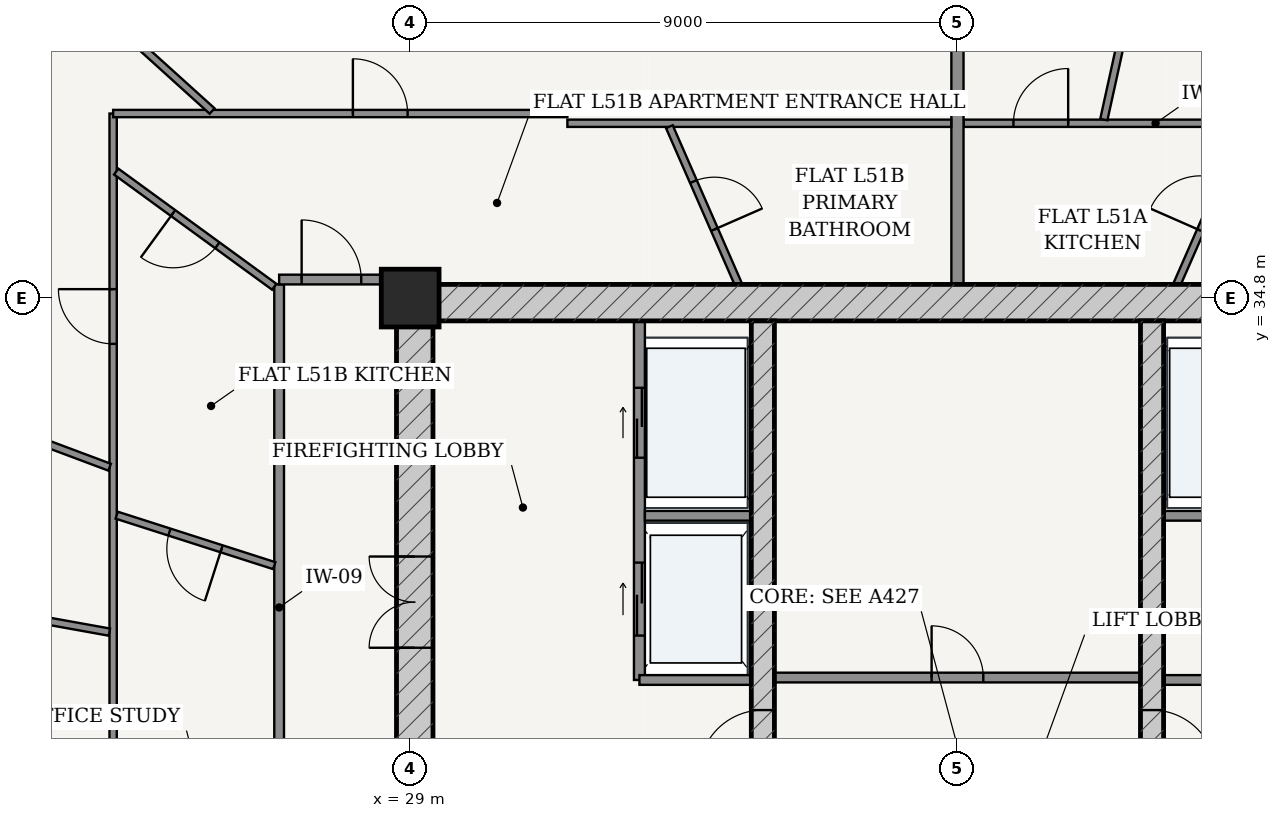
"""IFC4 building model, lengths in metres.
Left out: names, types, materials, properties, quantities, classifications, styles, units other than length and angle.
Written with IfcOpenShell. Run it as: python <this file> out.ifc"""

import sys

from ifc_helpers import new_model, si_unit, direction, frame, frame_2d, origin, origin_2d, place, context, subcontext, project, spatial, rectangle, extrude, source, transform, mapped, element, fill, save


model = new_model("IFC4")
c1 = context("Model", 3, precision=1e-05, world=origin(), true_north=direction((-0.2419218956, 0.970295726276)))
c2 = subcontext(c1, "Body", "Model", "MODEL_VIEW")
j1 = project(units=[si_unit("LENGTHUNIT", "METRE"), si_unit("PLANEANGLEUNIT", "RADIAN")], contexts=[c1])
p1 = place(None, origin())
s1 = spatial("IfcSite", under=j1, at=p1, CompositionType="ELEMENT")
p2 = place(p1, origin())
s2 = spatial("IfcBuilding", under=s1, at=p2, CompositionType="ELEMENT")
p3 = place(p2, frame((0.0, 0.0, 194.9)))
s3 = spatial("IfcBuildingStorey", under=s2, at=p3, CompositionType="ELEMENT", Elevation=194.9)
p4 = place(p3, frame((29.0, 34.8, 0.0), z_axis=(0.0, 0.0, 1.0), x_axis=(1.0, 0.0, 0.0)))
e1 = element("IfcColumn", 1, at=p4, inside=s3, PredefinedType="COLUMN", context=c2, shape_type="SweptSolid", body=[
    extrude(rectangle(XDim=0.95, YDim=0.95, at=origin_2d()), origin(), (0.0, 0.0, 1.0), 3.7),
])
p5 = place(p3, frame((28.775, 34.725, 0.0), z_axis=(0.0, 0.0, 1.0), x_axis=(1.0, 0.0, 0.0)))
e2 = element("IfcWall", 2, at=p5, inside=s3, PredefinedType="SHEAR", context=c2, shape_type="SweptSolid", body=[
    extrude(rectangle(XDim=18.45, YDim=0.6, at=frame_2d((9.225, 0.0))), origin(), (0.0, 0.0, 1.0), 3.435),
])
p6 = place(p3, frame((29.075, 19.175, 0.0), z_axis=(0.0, 0.0, 1.0), x_axis=(0.0, 1.0, 0.0)))
e3 = element("IfcWall", 3, at=p6, inside=s3, PredefinedType="SHEAR", context=c2, shape_type="SweptSolid", body=[
    extrude(rectangle(XDim=15.25, YDim=0.6, at=frame_2d((7.625, 0.0))), origin(), (0.0, 0.0, 1.0), 3.435),
])
p7 = place(p6, frame((9.875, 0.0, 0.0)))
e4 = element("IfcOpeningElement", 4, at=p7, cuts=e3, PredefinedType="OPENING", context=c2, shape_type="SweptSolid", body=[
    extrude(rectangle(XDim=1.5, YDim=2.2, at=frame_2d((0.75, 1.1))), frame((0.0, 0.31, 0.0), z_axis=(0.0, -1.0, 0.0), x_axis=(1.0, 0.0, 0.0)), (0.0, 0.0, 1.0), 0.62),
])
p8 = place(p3, frame((34.8, 19.175, 0.0), z_axis=(0.0, 0.0, 1.0), x_axis=(0.0, 1.0, 0.0)))
e5 = element("IfcWall", 5, at=p8, inside=s3, PredefinedType="SHEAR", context=c2, shape_type="SweptSolid", body=[
    extrude(rectangle(XDim=15.25, YDim=0.38, at=frame_2d((7.625, 0.0))), origin(), (0.0, 0.0, 1.0), 3.435),
])
p9 = place(p8, frame((7.8, 0.0, 0.0)))
e6 = element("IfcOpeningElement", 6, at=p9, cuts=e5, PredefinedType="OPENING", context=c2, shape_type="SweptSolid", body=[
    extrude(rectangle(XDim=1.05, YDim=2.15, at=frame_2d((0.525, 1.075))), frame((0.0, 0.2, 0.0), z_axis=(0.0, -1.0, 0.0), x_axis=(1.0, 0.0, 0.0)), (0.0, 0.0, 1.0), 0.4),
])
p10 = place(p3, frame((41.2, 19.175, 0.0), z_axis=(0.0, 0.0, 1.0), x_axis=(0.0, 1.0, 0.0)))
e7 = element("IfcWall", 7, at=p10, inside=s3, PredefinedType="SHEAR", context=c2, shape_type="SweptSolid", body=[
    extrude(rectangle(XDim=15.25, YDim=0.38, at=frame_2d((7.625, 0.0))), origin(), (0.0, 0.0, 1.0), 3.435),
])
p11 = place(p10, frame((7.8, 0.0, 0.0)))
e8 = element("IfcOpeningElement", 8, at=p11, cuts=e7, PredefinedType="OPENING", context=c2, shape_type="SweptSolid", body=[
    extrude(rectangle(XDim=1.05, YDim=2.15, at=frame_2d((0.525, 1.075))), frame((0.0, 0.2, 0.0), z_axis=(0.0, -1.0, 0.0), x_axis=(1.0, 0.0, 0.0)), (0.0, 0.0, 1.0), 0.4),
])
p12 = place(p3, frame((32.77, 28.52, 0.0), z_axis=(0.0, 0.0, 1.0), x_axis=(0.0, 1.0, 0.0)))
e9 = element("IfcWall", 9, at=p12, inside=s3, PredefinedType="PARTITIONING", context=c2, shape_type="SweptSolid", body=[
    extrude(rectangle(XDim=5.905, YDim=0.18, at=frame_2d((2.953, 0.0))), origin(), (0.0, 0.0, 1.0), 3.435),
])
p13 = place(p12, frame((3.655, 0.0, 0.0)))
e10 = element("IfcOpeningElement", 10, at=p13, cuts=e9, PredefinedType="OPENING", context=c2, shape_type="SweptSolid", body=[
    extrude(rectangle(XDim=1.15, YDim=2.2, at=frame_2d((0.575, 1.1))), frame((0.0, 0.1, 0.0), z_axis=(0.0, -1.0, 0.0), x_axis=(1.0, 0.0, 0.0)), (0.0, 0.0, 1.0), 0.2),
])
p14 = place(p12, frame((0.73, 0.0, 0.0)))
e11 = element("IfcOpeningElement", 11, at=p14, cuts=e9, PredefinedType="OPENING", context=c2, shape_type="SweptSolid", body=[
    extrude(rectangle(XDim=1.2, YDim=2.25, at=frame_2d((0.6, 1.125))), frame((0.0, 0.1, 0.0), z_axis=(0.0, -1.0, 0.0), x_axis=(1.0, 0.0, 0.0)), (0.0, 0.0, 1.0), 0.2),
])
p15 = place(p3, frame((32.86, 31.22, 0.0), z_axis=(0.0, 0.0, 1.0), x_axis=(1.0, 0.0, 0.0)))
e12 = element("IfcWall", 12, at=p15, inside=s3, PredefinedType="PARTITIONING", context=c2, shape_type="SweptSolid", body=[
    extrude(rectangle(XDim=1.75, YDim=0.16, at=frame_2d((0.875, 0.0))), origin(), (0.0, 0.0, 1.0), 3.435),
])
p16 = place(p3, frame((32.77, 28.52, 0.0), z_axis=(0.0, 0.0, 1.0), x_axis=(1.0, 0.0, 0.0)))
e13 = element("IfcWall", 13, at=p16, inside=s3, PredefinedType="PARTITIONING", context=c2, shape_type="SweptSolid", body=[
    extrude(rectangle(XDim=1.84, YDim=0.16, at=frame_2d((0.92, 0.0))), origin(), (0.0, 0.0, 1.0), 3.435),
])
p17 = place(p3, frame((41.39, 31.22, 0.0), z_axis=(0.0, 0.0, 1.0), x_axis=(1.0, 0.0, 0.0)))
e14 = element("IfcWall", 14, at=p17, inside=s3, PredefinedType="PARTITIONING", context=c2, shape_type="SweptSolid", body=[
    extrude(rectangle(XDim=1.75, YDim=0.16, at=frame_2d((0.875, 0.0))), origin(), (0.0, 0.0, 1.0), 3.435),
])
p18 = place(p3, frame((41.39, 28.52, 0.0), z_axis=(0.0, 0.0, 1.0), x_axis=(1.0, 0.0, 0.0)))
e15 = element("IfcWall", 15, at=p18, inside=s3, PredefinedType="PARTITIONING", context=c2, shape_type="SweptSolid", body=[
    extrude(rectangle(XDim=1.84, YDim=0.16, at=frame_2d((0.92, 0.0))), origin(), (0.0, 0.0, 1.0), 3.435),
])
p19 = place(p3, frame((34.99, 28.56, 0.0), z_axis=(0.0, 0.0, 1.0), x_axis=(1.0, 0.0, 0.0)))
e16 = element("IfcWall", 16, at=p19, inside=s3, PredefinedType="PARTITIONING", context=c2, shape_type="SweptSolid", body=[
    extrude(rectangle(XDim=6.02, YDim=0.16, at=frame_2d((3.01, 0.0))), origin(), (0.0, 0.0, 1.0), 3.435),
])
p20 = place(p19, frame((2.585, 0.0, 0.0)))
e17 = element("IfcOpeningElement", 17, at=p20, cuts=e16, PredefinedType="OPENING", context=c2, shape_type="SweptSolid", body=[
    extrude(rectangle(XDim=0.85, YDim=2.1, at=frame_2d((0.425, 1.05))), frame((0.0, 0.09, 0.0), z_axis=(0.0, -1.0, 0.0), x_axis=(1.0, 0.0, 0.0)), (0.0, 0.0, 1.0), 0.18),
])
p21 = place(p3, frame((26.845, 24.4, 0.0), z_axis=(0.0, 0.0, 1.0), x_axis=(0.0, 1.0, 0.0)))
e18 = element("IfcWall", 18, at=p21, inside=s3, PredefinedType="PARTITIONING", context=c2, shape_type="SweptSolid", body=[
    extrude(rectangle(XDim=10.625, YDim=0.16, at=frame_2d((5.312, 0.0))), origin(), (0.0, 0.0, 1.0), 2.951),
])
p22 = place(p3, frame((26.845, 35.105, 0.0), z_axis=(0.0, 0.0, 1.0), x_axis=(1.0, 0.0, 0.0)))
e19 = element("IfcWall", 19, at=p22, inside=s3, PredefinedType="PARTITIONING", context=c2, shape_type="SweptSolid", body=[
    extrude(rectangle(XDim=1.93, YDim=0.16, at=frame_2d((0.965, 0.0))), origin(), (0.0, 0.0, 1.0), 3.435),
])
p23 = place(p22, frame((0.37, 0.0, 0.0)))
e20 = element("IfcOpeningElement", 20, at=p23, cuts=e19, PredefinedType="OPENING", context=c2, shape_type="SweptSolid", body=[
    extrude(rectangle(XDim=0.98, YDim=2.2, at=frame_2d((0.49, 1.1))), frame((0.0, 0.09, 0.0), z_axis=(0.0, -1.0, 0.0), x_axis=(1.0, 0.0, 0.0)), (0.0, 0.0, 1.0), 0.18),
])
p24 = place(p3, frame((38.102, 37.675, 0.0), z_axis=(0.0, 0.0, 1.0), x_axis=(1.0, 0.0, 0.0)))
e21 = element("IfcWall", 21, at=p24, inside=s3, PredefinedType="PARTITIONING", context=c2, shape_type="SweptSolid", body=[
    extrude(rectangle(XDim=6.313, YDim=0.12, at=frame_2d((3.156, 0.0))), origin(), (0.0, 0.0, 1.0), 2.951),
])
p25 = place(p24, frame((0.819, 0.0, 0.0)))
e22 = element("IfcOpeningElement", 22, at=p25, cuts=e21, PredefinedType="OPENING", context=c2, shape_type="SweptSolid", body=[
    extrude(rectangle(XDim=0.9, YDim=2.15, at=frame_2d((0.45, 1.075))), frame((0.0, 0.07, 0.0), z_axis=(0.0, -1.0, 0.0), x_axis=(1.0, 0.0, 0.0)), (0.0, 0.0, 1.0), 0.14),
])
p26 = place(p3, frame((40.407, 37.736, 0.0), z_axis=(0.0, 0.0, 1.0), x_axis=(0.214971015179, 0.97662042915, 0.0)))
e23 = element("IfcWall", 23, at=p26, inside=s3, PredefinedType="PARTITIONING", context=c2, shape_type="SweptSolid", body=[
    extrude(rectangle(XDim=8.485, YDim=0.12, at=frame_2d((4.242, 0.0))), origin(), (0.0, 0.0, 1.0), 2.951),
])
p27 = place(p26, frame((2.78, 0.0, 0.0)))
e24 = element("IfcOpeningElement", 24, at=p27, cuts=e23, PredefinedType="OPENING", context=c2, shape_type="SweptSolid", body=[
    extrude(rectangle(XDim=0.9, YDim=2.15, at=frame_2d((0.45, 1.075))), frame((0.0, 0.07, 0.0), z_axis=(0.0, -1.0, 0.0), x_axis=(1.0, 0.0, 0.0)), (0.0, 0.0, 1.0), 0.14),
])
p28 = place(p3, frame((41.61, 35.027, 0.0), z_axis=(0.0, 0.0, 1.0), x_axis=(0.401859508224, 0.915701335398, 0.0)))
e25 = element("IfcWall", 25, at=p28, inside=s3, PredefinedType="PARTITIONING", context=c2, shape_type="SweptSolid", body=[
    extrude(rectangle(XDim=2.83, YDim=0.12, at=frame_2d((1.415, 0.0))), origin(), (0.0, 0.0, 1.0), 3.435),
])
p29 = place(p28, frame((0.965, 0.0, 0.0)))
e26 = element("IfcOpeningElement", 26, at=p29, cuts=e25, PredefinedType="OPENING", context=c2, shape_type="SweptSolid", body=[
    extrude(rectangle(XDim=0.9, YDim=2.15, at=frame_2d((0.45, 1.075))), frame((0.0, 0.07, 0.0), z_axis=(0.0, -1.0, 0.0), x_axis=(1.0, 0.0, 0.0)), (0.0, 0.0, 1.0), 0.14),
])
p30 = place(p3, frame((38.0, 35.027, 0.0), z_axis=(0.0, 0.0, 1.0), x_axis=(0.0, 1.0, 0.0)))
e27 = element("IfcWall", 27, at=p30, inside=s3, PredefinedType="PARTITIONING", context=c2, shape_type="SweptSolid", body=[
    extrude(rectangle(XDim=11.413, YDim=0.2, at=frame_2d((5.707, 0.0))), origin(), (0.0, 0.0, 1.0), 2.52),
])
p31 = place(p3, frame((24.115, 24.406, 0.0), z_axis=(0.0, 0.0, 1.0), x_axis=(0.0, 1.0, 0.0)))
e28 = element("IfcWall", 28, at=p31, inside=s3, PredefinedType="PARTITIONING", context=c2, shape_type="SweptSolid", body=[
    extrude(rectangle(XDim=13.429, YDim=0.12, at=frame_2d((6.714, 0.0))), origin(), (0.0, 0.0, 1.0), 2.951),
])
p32 = place(p31, frame((9.641, 0.0, 0.0)))
e29 = element("IfcOpeningElement", 29, at=p32, cuts=e28, PredefinedType="OPENING", context=c2, shape_type="SweptSolid", body=[
    extrude(rectangle(XDim=0.9, YDim=2.15, at=frame_2d((0.45, 1.075))), frame((0.0, 0.07, 0.0), z_axis=(0.0, -1.0, 0.0), x_axis=(1.0, 0.0, 0.0)), (0.0, 0.0, 1.0), 0.14),
])
p33 = place(p3, frame((24.115, 37.835, 0.0), z_axis=(0.0, 0.0, 1.0), x_axis=(1.0, 0.0, 0.0)))
e30 = element("IfcWall", 30, at=p33, inside=s3, PredefinedType="PARTITIONING", context=c2, shape_type="SweptSolid", body=[
    extrude(rectangle(XDim=7.47, YDim=0.12, at=frame_2d((3.735, 0.0))), origin(), (0.0, 0.0, 1.0), 2.951),
])
p34 = place(p33, frame((3.943, 0.0, 0.0)))
e31 = element("IfcOpeningElement", 31, at=p34, cuts=e30, PredefinedType="OPENING", context=c2, shape_type="SweptSolid", body=[
    extrude(rectangle(XDim=0.9, YDim=2.15, at=frame_2d((0.45, 1.075))), frame((0.0, 0.07, 0.0), z_axis=(0.0, -1.0, 0.0), x_axis=(1.0, 0.0, 0.0)), (0.0, 0.0, 1.0), 0.14),
])
p35 = place(p3, frame((31.585, 37.675, 0.0), z_axis=(0.0, 0.0, 1.0), x_axis=(1.0, 0.0, 0.0)))
e32 = element("IfcWall", 32, at=p35, inside=s3, PredefinedType="PARTITIONING", context=c2, shape_type="SweptSolid", body=[
    extrude(rectangle(XDim=6.313, YDim=0.12, at=frame_2d((3.156, 0.0))), origin(), (0.0, 0.0, 1.0), 2.951),
])
p36 = place(p3, frame((25.743, 37.876, 0.0), z_axis=(0.0, 0.0, 1.0), x_axis=(-0.741943837234, 0.670462036502, 0.0)))
e33 = element("IfcWall", 33, at=p36, inside=s3, PredefinedType="PARTITIONING", context=c2, shape_type="SweptSolid", body=[
    extrude(rectangle(XDim=4.194, YDim=0.12, at=frame_2d((2.097, 0.0))), origin(), (0.0, 0.0, 1.0), 2.951),
])
p37 = place(p3, frame((24.057, 32.019, 0.0), z_axis=(0.0, 0.0, 1.0), x_axis=(-0.936540194592, 0.350560214389, 0.0)))
e34 = element("IfcWall", 34, at=p37, inside=s3, PredefinedType="PARTITIONING", context=c2, shape_type="SweptSolid", body=[
    extrude(rectangle(XDim=6.556, YDim=0.12, at=frame_2d((3.278, 0.0))), origin(), (0.0, 0.0, 1.0), 2.951),
])
p38 = place(p37, frame((2.828, 0.0, 0.0)))
e35 = element("IfcOpeningElement", 35, at=p38, cuts=e34, PredefinedType="OPENING", context=c2, shape_type="SweptSolid", body=[
    extrude(rectangle(XDim=0.9, YDim=2.15, at=frame_2d((0.45, 1.075))), frame((0.0, 0.07, 0.0), z_axis=(0.0, -1.0, 0.0), x_axis=(1.0, 0.0, 0.0)), (0.0, 0.0, 1.0), 0.14),
])
p39 = place(p3, frame((24.054, 29.307, 0.0), z_axis=(0.0, 0.0, 1.0), x_axis=(-0.984227185588, 0.176909149424, 0.0)))
e36 = element("IfcWall", 36, at=p39, inside=s3, PredefinedType="PARTITIONING", context=c2, shape_type="SweptSolid", body=[
    extrude(rectangle(XDim=7.448, YDim=0.12, at=frame_2d((3.724, 0.0))), origin(), (0.0, 0.0, 1.0), 2.951),
])
p40 = place(p39, frame((2.264, 0.0, 0.0)))
e37 = element("IfcOpeningElement", 37, at=p40, cuts=e36, PredefinedType="OPENING", context=c2, shape_type="SweptSolid", body=[
    extrude(rectangle(XDim=0.9, YDim=2.15, at=frame_2d((0.45, 1.075))), frame((0.0, 0.07, 0.0), z_axis=(0.0, -1.0, 0.0), x_axis=(1.0, 0.0, 0.0)), (0.0, 0.0, 1.0), 0.14),
])
p41 = place(p3, frame((34.397, 35.027, 0.0), z_axis=(0.0, 0.0, 1.0), x_axis=(-0.401135725485, 0.916018629581, 0.0)))
e38 = element("IfcWall", 38, at=p41, inside=s3, PredefinedType="PARTITIONING", context=c2, shape_type="SweptSolid", body=[
    extrude(rectangle(XDim=2.829, YDim=0.12, at=frame_2d((1.415, 0.0))), origin(), (0.0, 0.0, 1.0), 3.435),
])
p42 = place(p41, frame((0.985, 0.0, 0.0)))
e39 = element("IfcOpeningElement", 39, at=p42, cuts=e38, PredefinedType="OPENING", context=c2, shape_type="SweptSolid", body=[
    extrude(rectangle(XDim=0.86, YDim=2.15, at=frame_2d((0.43, 1.075))), frame((0.0, 0.07, 0.0), z_axis=(0.0, -1.0, 0.0), x_axis=(1.0, 0.0, 0.0)), (0.0, 0.0, 1.0), 0.14),
])
p43 = place(p3, frame((26.765, 34.986, 0.0), z_axis=(0.0, 0.0, 1.0), x_axis=(-0.808220499107, 0.588879974887, 0.0)))
e40 = element("IfcWall", 40, at=p43, inside=s3, PredefinedType="PARTITIONING", context=c2, shape_type="SweptSolid", body=[
    extrude(rectangle(XDim=3.217, YDim=0.12, at=frame_2d((1.608, 0.0))), origin(), (0.0, 0.0, 1.0), 3.11),
])
p44 = place(p43, frame((1.158, 0.0, 0.0)))
e41 = element("IfcOpeningElement", 41, at=p44, cuts=e40, PredefinedType="OPENING", context=c2, shape_type="SweptSolid", body=[
    extrude(rectangle(XDim=0.9, YDim=2.15, at=frame_2d((0.45, 1.075))), frame((0.0, 0.07, 0.0), z_axis=(0.0, -1.0, 0.0), x_axis=(1.0, 0.0, 0.0)), (0.0, 0.0, 1.0), 0.14),
])
p45 = place(p3, frame((26.765, 30.4, 0.0), z_axis=(0.0, 0.0, 1.0), x_axis=(-0.952315722301, 0.305114347514, 0.0)))
e42 = element("IfcWall", 42, at=p45, inside=s3, PredefinedType="PARTITIONING", context=c2, shape_type="SweptSolid", body=[
    extrude(rectangle(XDim=2.72, YDim=0.12, at=frame_2d((1.36, 0.0))), origin(), (0.0, 0.0, 1.0), 3.435),
])
p46 = place(p45, frame((0.91, 0.0, 0.0)))
e43 = element("IfcOpeningElement", 43, at=p46, cuts=e42, PredefinedType="OPENING", context=c2, shape_type="SweptSolid", body=[
    extrude(rectangle(XDim=0.9, YDim=2.15, at=frame_2d((0.45, 1.075))), frame((0.0, 0.07, 0.0), z_axis=(0.0, -1.0, 0.0), x_axis=(1.0, 0.0, 0.0)), (0.0, 0.0, 1.0), 0.14),
])
m1 = source(origin(), c2, "Body", "SweptSolid", [
    extrude(rectangle(XDim=1.5, YDim=2.2, at=frame_2d((0.75, 1.1))), frame((0.0, 0.025, 0.0), z_axis=(0.0, -1.0, 0.0), x_axis=(1.0, 0.0, 0.0)), (0.0, 0.0, 1.0), 0.05),
])
p47 = place(p7, origin())
e44 = element("IfcDoor", 44, at=p47, inside=s3, OperationType="DOUBLE_DOOR_SINGLE_SWING", PredefinedType="DOOR", context=c2, shape_type="MappedRepresentation", body=[
    mapped(m1, transform((0.0, 0.0, 0.0), scale=1.0)),
])
fill(e4, e44)
m2 = source(origin(), c2, "Body", "SweptSolid", [
    extrude(rectangle(XDim=1.05, YDim=2.15, at=frame_2d((0.525, 1.075))), frame((0.0, 0.025, 0.0), z_axis=(0.0, -1.0, 0.0), x_axis=(1.0, 0.0, 0.0)), (0.0, 0.0, 1.0), 0.05),
])
p48 = place(p9, origin())
e45 = element("IfcDoor", 45, at=p48, inside=s3, OperationType="SINGLE_SWING_LEFT", PredefinedType="DOOR", context=c2, shape_type="MappedRepresentation", body=[
    mapped(m2, transform((0.0, 0.0, 0.0), scale=1.0)),
])
fill(e6, e45)
p49 = place(p11, frame((1.05, 0.0, 0.0), z_axis=(0.0, 0.0, 1.0), x_axis=(-1.0, 0.0, 0.0)))
e46 = element("IfcDoor", 46, at=p49, inside=s3, OperationType="SINGLE_SWING_RIGHT", PredefinedType="DOOR", context=c2, shape_type="MappedRepresentation", body=[
    mapped(m2, transform((0.0, 0.0, 0.0), scale=1.0)),
])
fill(e8, e46)
m3 = source(origin(), c2, "Body", "SweptSolid", [
    extrude(rectangle(XDim=0.85, YDim=2.1, at=frame_2d((0.425, 1.05))), frame((0.0, 0.025, 0.0), z_axis=(0.0, -1.0, 0.0), x_axis=(1.0, 0.0, 0.0)), (0.0, 0.0, 1.0), 0.05),
])
p50 = place(p20, origin())
e47 = element("IfcDoor", 47, at=p50, inside=s3, OperationType="SINGLE_SWING_LEFT", PredefinedType="DOOR", context=c2, shape_type="MappedRepresentation", body=[
    mapped(m3, transform((0.0, 0.0, 0.0), scale=1.0)),
])
fill(e17, e47)
m4 = source(origin(), c2, "Body", "SweptSolid", [
    extrude(rectangle(XDim=1.15, YDim=2.2, at=frame_2d((0.575, 1.1))), frame((0.0, 0.025, 0.0), z_axis=(0.0, -1.0, 0.0), x_axis=(1.0, 0.0, 0.0)), (0.0, 0.0, 1.0), 0.05),
])
p51 = place(p13, origin())
e48 = element("IfcDoor", 48, at=p51, inside=s3, OperationType="DOUBLE_DOOR_SLIDING", PredefinedType="DOOR", context=c2, shape_type="MappedRepresentation", body=[
    mapped(m4, transform((0.0, 0.0, 0.0), scale=1.0)),
])
fill(e10, e48)
m5 = source(origin(), c2, "Body", "SweptSolid", [
    extrude(rectangle(XDim=1.2, YDim=2.25, at=frame_2d((0.6, 1.125))), frame((0.0, 0.025, 0.0), z_axis=(0.0, -1.0, 0.0), x_axis=(1.0, 0.0, 0.0)), (0.0, 0.0, 1.0), 0.05),
])
p52 = place(p14, origin())
e49 = element("IfcDoor", 49, at=p52, inside=s3, OperationType="DOUBLE_DOOR_SLIDING", PredefinedType="DOOR", context=c2, shape_type="MappedRepresentation", body=[
    mapped(m5, transform((0.0, 0.0, 0.0), scale=1.0)),
])
fill(e11, e49)
m6 = source(origin(), c2, "Body", "SweptSolid", [
    extrude(rectangle(XDim=0.9, YDim=2.15, at=frame_2d((0.45, 1.075))), frame((0.0, 0.025, 0.0), z_axis=(0.0, -1.0, 0.0), x_axis=(1.0, 0.0, 0.0)), (0.0, 0.0, 1.0), 0.05),
])
p53 = place(p29, origin())
e50 = element("IfcDoor", 50, at=p53, inside=s3, OperationType="SINGLE_SWING_LEFT", PredefinedType="DOOR", context=c2, shape_type="MappedRepresentation", body=[
    mapped(m6, transform((0.0, 0.0, 0.0), scale=1.0)),
])
fill(e26, e50)
p54 = place(p25, origin())
e51 = element("IfcDoor", 51, at=p54, inside=s3, OperationType="SINGLE_SWING_RIGHT", PredefinedType="DOOR", context=c2, shape_type="MappedRepresentation", body=[
    mapped(m6, transform((0.0, 0.0, 0.0), scale=1.0)),
])
fill(e22, e51)
m7 = source(origin(), c2, "Body", "SweptSolid", [
    extrude(rectangle(XDim=0.98, YDim=2.2, at=frame_2d((0.49, 1.1))), frame((0.0, 0.025, 0.0), z_axis=(0.0, -1.0, 0.0), x_axis=(1.0, 0.0, 0.0)), (0.0, 0.0, 1.0), 0.05),
])
p55 = place(p23, origin())
e52 = element("IfcDoor", 52, at=p55, inside=s3, OperationType="SINGLE_SWING_LEFT", PredefinedType="DOOR", context=c2, shape_type="MappedRepresentation", body=[
    mapped(m7, transform((0.0, 0.0, 0.0), scale=1.0)),
])
fill(e20, e52)
m8 = source(origin(), c2, "Body", "SweptSolid", [
    extrude(rectangle(XDim=0.86, YDim=2.15, at=frame_2d((0.43, 1.075))), frame((0.0, 0.025, 0.0), z_axis=(0.0, -1.0, 0.0), x_axis=(1.0, 0.0, 0.0)), (0.0, 0.0, 1.0), 0.05),
])
p56 = place(p42, frame((0.86, 0.0, 0.0), z_axis=(0.0, 0.0, 1.0), x_axis=(-1.0, 0.0, 0.0)))
e53 = element("IfcDoor", 53, at=p56, inside=s3, OperationType="SINGLE_SWING_RIGHT", PredefinedType="DOOR", context=c2, shape_type="MappedRepresentation", body=[
    mapped(m8, transform((0.0, 0.0, 0.0), scale=1.0)),
])
fill(e39, e53)
p57 = place(p34, origin())
e54 = element("IfcDoor", 54, at=p57, inside=s3, OperationType="SINGLE_SWING_LEFT", PredefinedType="DOOR", context=c2, shape_type="MappedRepresentation", body=[
    mapped(m6, transform((0.0, 0.0, 0.0), scale=1.0)),
])
fill(e31, e54)
p58 = place(p44, origin())
e55 = element("IfcDoor", 55, at=p58, inside=s3, OperationType="SINGLE_SWING_RIGHT", PredefinedType="DOOR", context=c2, shape_type="MappedRepresentation", body=[
    mapped(m6, transform((0.0, 0.0, 0.0), scale=1.0)),
])
fill(e41, e55)
p59 = place(p46, origin())
e56 = element("IfcDoor", 56, at=p59, inside=s3, OperationType="SINGLE_SWING_LEFT", PredefinedType="DOOR", context=c2, shape_type="MappedRepresentation", body=[
    mapped(m6, transform((0.0, 0.0, 0.0), scale=1.0)),
])
fill(e43, e56)
p60 = place(p32, origin())
e57 = element("IfcDoor", 57, at=p60, inside=s3, OperationType="SINGLE_SWING_RIGHT", PredefinedType="DOOR", context=c2, shape_type="MappedRepresentation", body=[
    mapped(m6, transform((0.0, 0.0, 0.0), scale=1.0)),
])
fill(e29, e57)
save(model, sys.argv[1])
